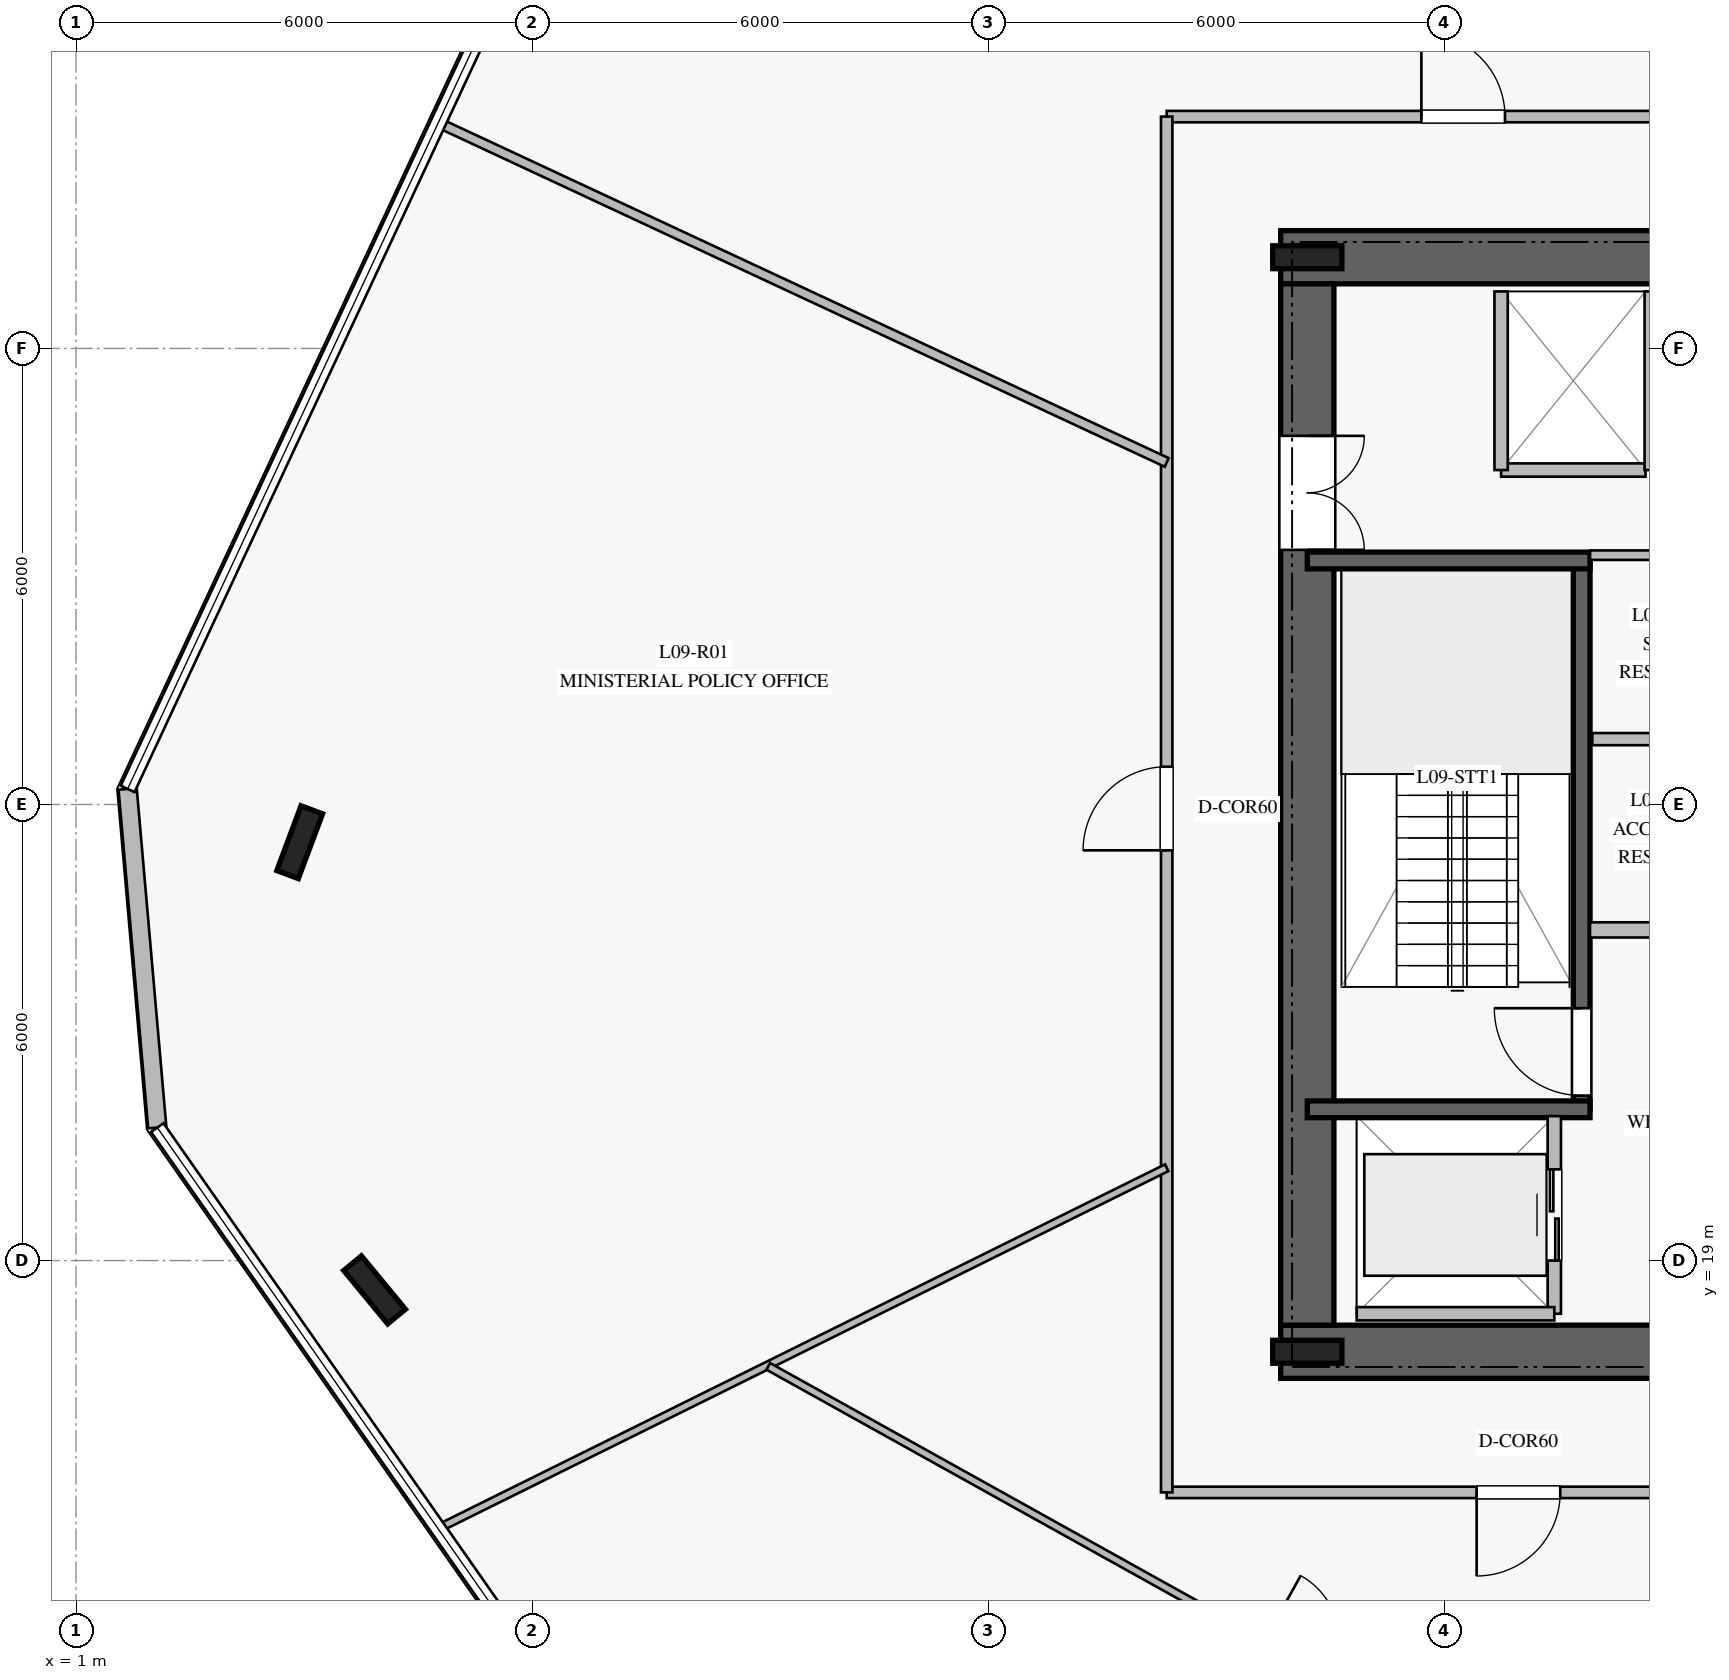
"""IFC4 building model, lengths in metres.
Left out: names, types, materials, properties, quantities, classifications, styles, units other than length and angle.
Written with IfcOpenShell. Run it as: python <this file> out.ifc"""

import sys

from ifc_helpers import new_model, si_unit, direction, frame, frame_2d, origin, origin_2d, place, context, subcontext, project, spatial, rectangle, i_section, extrude, element, fill, save


model = new_model("IFC4")
c1 = context("Model", 3, precision=1e-05, world=origin(), true_north=direction((0.0, 1.0)))
c2 = subcontext(c1, "Body", "Model", "MODEL_VIEW")
j1 = project(units=[si_unit("LENGTHUNIT", "METRE"), si_unit("PLANEANGLEUNIT", "RADIAN")], contexts=[c1])
p1 = place(None, origin())
s1 = spatial("IfcSite", under=j1, at=p1, CompositionType="ELEMENT")
p2 = place(p1, origin())
s2 = spatial("IfcBuilding", under=s1, at=p2, CompositionType="ELEMENT")
p3 = place(p2, frame((0.0, 0.0, 40.0)))
s3 = spatial("IfcBuildingStorey", under=s2, at=p3, CompositionType="ELEMENT", Elevation=40.0)
p4 = place(p3, frame((16.85, 17.8, 0.0), z_axis=(0.0, 0.0, 1.0), x_axis=(1.0, 0.0, 0.0)))
e1 = element("IfcWall", 1, at=p4, inside=s3, PredefinedType="SHEAR", context=c2, shape_type="SweptSolid", body=[
    extrude(rectangle(XDim=16.3, YDim=0.7, at=frame_2d((8.15, 0.0))), origin(), (0.0, 0.0, 1.0), 3.76),
])
p5 = place(p4, frame((5.1, 0.0, 0.0)))
e2 = element("IfcOpeningElement", 2, at=p5, cuts=e1, PredefinedType="OPENING", context=c2, shape_type="SweptSolid", body=[
    extrude(rectangle(XDim=1.2, YDim=2.25, at=frame_2d((0.6, 1.125))), frame((0.0, 0.36, 0.0), z_axis=(0.0, -1.0, 0.0), x_axis=(1.0, 0.0, 0.0)), (0.0, 0.0, 1.0), 0.72),
])
p6 = place(p4, frame((14.05, 0.0, 0.0)))
e3 = element("IfcOpeningElement", 3, at=p6, cuts=e1, PredefinedType="OPENING", context=c2, shape_type="SweptSolid", body=[
    extrude(rectangle(XDim=0.9, YDim=2.1, at=frame_2d((0.45, 1.05))), frame((0.0, 0.36, 0.0), z_axis=(0.0, -1.0, 0.0), x_axis=(1.0, 0.0, 0.0)), (0.0, 0.0, 1.0), 0.72),
])
p7 = place(p4, frame((7.95, 0.0, 0.0)))
e4 = element("IfcOpeningElement", 4, at=p7, cuts=e1, PredefinedType="OPENING", context=c2, shape_type="SweptSolid", body=[
    extrude(rectangle(XDim=1.1, YDim=2.2, at=frame_2d((0.55, 1.1))), frame((0.0, 0.36, 0.0), z_axis=(0.0, -1.0, 0.0), x_axis=(1.0, 0.0, 0.0)), (0.0, 0.0, 1.0), 0.72),
])
p8 = place(p4, frame((9.925, 0.0, 0.0)))
e5 = element("IfcOpeningElement", 5, at=p8, cuts=e1, PredefinedType="OPENING", context=c2, shape_type="SweptSolid", body=[
    extrude(rectangle(XDim=1.1, YDim=2.2, at=frame_2d((0.55, 1.1))), frame((0.0, 0.36, 0.0), z_axis=(0.0, -1.0, 0.0), x_axis=(1.0, 0.0, 0.0)), (0.0, 0.0, 1.0), 0.72),
])
p9 = place(p4, frame((11.9, 0.0, 0.0)))
e6 = element("IfcOpeningElement", 6, at=p9, cuts=e1, PredefinedType="OPENING", context=c2, shape_type="SweptSolid", body=[
    extrude(rectangle(XDim=1.1, YDim=2.2, at=frame_2d((0.55, 1.1))), frame((0.0, 0.36, 0.0), z_axis=(0.0, -1.0, 0.0), x_axis=(1.0, 0.0, 0.0)), (0.0, 0.0, 1.0), 0.72),
])
p10 = place(p3, frame((33.15, 32.2, 0.0), z_axis=(0.0, 0.0, 1.0), x_axis=(-1.0, 0.0, 0.0)))
e7 = element("IfcWall", 7, at=p10, inside=s3, PredefinedType="SHEAR", context=c2, shape_type="SweptSolid", body=[
    extrude(rectangle(XDim=16.3, YDim=0.7, at=frame_2d((8.15, 0.0))), origin(), (0.0, 0.0, 1.0), 3.76),
])
p11 = place(p10, frame((5.1, 0.0, 0.0)))
e8 = element("IfcOpeningElement", 8, at=p11, cuts=e7, PredefinedType="OPENING", context=c2, shape_type="SweptSolid", body=[
    extrude(rectangle(XDim=1.2, YDim=2.25, at=frame_2d((0.6, 1.125))), frame((0.0, 0.36, 0.0), z_axis=(0.0, -1.0, 0.0), x_axis=(1.0, 0.0, 0.0)), (0.0, 0.0, 1.0), 0.72),
])
p12 = place(p3, frame((17.2, 31.85, 0.0), z_axis=(0.0, 0.0, 1.0), x_axis=(0.0, -1.0, 0.0)))
e9 = element("IfcWall", 9, at=p12, inside=s3, PredefinedType="SHEAR", context=c2, shape_type="SweptSolid", body=[
    extrude(rectangle(XDim=13.7, YDim=0.7, at=frame_2d((6.85, 0.0))), origin(), (0.0, 0.0, 1.0), 3.76),
])
p13 = place(p12, frame((2.0, 0.0, 0.0)))
e10 = element("IfcOpeningElement", 10, at=p13, cuts=e9, PredefinedType="OPENING", context=c2, shape_type="SweptSolid", body=[
    extrude(rectangle(XDim=1.5, YDim=2.2, at=frame_2d((0.75, 1.1))), frame((0.0, 0.36, 0.0), z_axis=(0.0, -1.0, 0.0), x_axis=(1.0, 0.0, 0.0)), (0.0, 0.0, 1.0), 0.72),
])
for number, where, z_axis, x_axis in (
    (11, (17.2, 17.8, 0.0), (0.0, 0.0, 1.0), (1.0, 0.0, 0.0)),
    (12, (17.2, 32.2, 0.0), (0.0, 0.0, 1.0), (1.0, 0.0, 0.0)),
):
    element("IfcColumn", number, at=place(p3, frame(where, z_axis=z_axis, x_axis=x_axis)), inside=s3, PredefinedType="COLUMN", context=c2, shape_type="SweptSolid", body=[
        extrude(i_section(OverallWidth=0.302, OverallDepth=0.91, WebThickness=0.021, FlangeThickness=0.04, at=origin_2d()), origin(), (0.0, 0.0, 1.0), 4.0),
    ])
p14 = place(p3, frame((20.81, 20.99, 0.0), z_axis=(0.0, 0.0, 1.0), x_axis=(0.0, 1.0, 0.0)))
e13 = element("IfcWall", 13, at=p14, inside=s3, PredefinedType="SOLIDWALL", context=c2, shape_type="SweptSolid", body=[
    extrude(rectangle(XDim=7.22, YDim=0.22, at=frame_2d((3.61, 0.0))), origin(), (0.0, 0.0, 1.0), 3.76),
])
p15 = place(p14, frame((0.18, 0.0, 0.0)))
e14 = element("IfcOpeningElement", 14, at=p15, cuts=e13, PredefinedType="OPENING", context=c2, shape_type="SweptSolid", body=[
    extrude(rectangle(XDim=1.15, YDim=2.2, at=frame_2d((0.575, 1.1))), frame((0.0, 0.12, 0.0), z_axis=(0.0, -1.0, 0.0), x_axis=(1.0, 0.0, 0.0)), (0.0, 0.0, 1.0), 0.24),
])
for number, where, z_axis, x_axis in (
    (15, (17.2, 20.99, 0.0), (0.0, 0.0, 1.0), (1.0, 0.0, 0.0)),
    (16, (17.2, 28.21, 0.0), (0.0, 0.0, 1.0), (1.0, 0.0, 0.0)),
):
    element("IfcWall", number, at=place(p3, frame(where, z_axis=z_axis, x_axis=x_axis)), inside=s3, PredefinedType="SOLIDWALL", context=c2, shape_type="SweptSolid", body=[
        extrude(rectangle(XDim=3.72, YDim=0.22, at=frame_2d((1.86, 0.0))), origin(), (0.0, 0.0, 1.0), 3.76),
    ])
for number, where, z_axis, x_axis in (
    (17, (3.943, 24.504, 0.0), (0.0, 0.0, 1.0), (0.35, 0.937, 0.0)),
    (18, (4.928, 18.614, 0.0), (0.0, 0.0, 1.0), (-0.636, 0.772, 0.0)),
):
    element("IfcColumn", number, at=place(p3, frame(where, z_axis=z_axis, x_axis=x_axis)), inside=s3, PredefinedType="COLUMN", context=c2, shape_type="SweptSolid", body=[
        extrude(i_section(OverallWidth=0.302, OverallDepth=0.91, WebThickness=0.021, FlangeThickness=0.04, at=origin_2d()), origin(), (0.0, 0.0, 1.0), 4.0),
    ])
p16 = place(p3, frame((1.679, 25.205, 0.0), z_axis=(0.0, 0.0, 1.0), x_axis=(0.087218406941, -0.996189213699, 0.0)))
e19 = element("IfcWall", 19, at=p16, inside=s3, PredefinedType="STANDARD", context=c2, shape_type="SweptSolid", body=[
    extrude(rectangle(XDim=4.473, YDim=0.24, at=frame_2d((2.237, 0.0))), origin(), (0.0, 0.0, 1.0), 3.76),
])
p17 = place(p3, frame((20.92, 23.35, 0.0), z_axis=(0.0, 0.0, 1.0), x_axis=(1.0, 0.0, 0.0)))
e20 = element("IfcWall", 20, at=p17, inside=s3, PredefinedType="PARTITIONING", context=c2, shape_type="SweptSolid", body=[
    extrude(rectangle(XDim=3.38, YDim=0.2, at=frame_2d((1.69, 0.0))), origin(), (0.0, 0.0, 1.0), 3.76),
])
p18 = place(p3, frame((20.92, 28.28, 0.0), z_axis=(0.0, 0.0, 1.0), x_axis=(1.0, 0.0, 0.0)))
e21 = element("IfcWall", 21, at=p18, inside=s3, PredefinedType="PARTITIONING", context=c2, shape_type="SweptSolid", body=[
    extrude(rectangle(XDim=3.405, YDim=0.125, at=frame_2d((1.703, 0.0))), origin(), (0.0, 0.0, 1.0), 3.76),
])
p19 = place(p3, frame((20.95, 25.86, 0.0), z_axis=(0.0, 0.0, 1.0), x_axis=(1.0, 0.0, 0.0)))
e22 = element("IfcWall", 22, at=p19, inside=s3, PredefinedType="PLUMBINGWALL", context=c2, shape_type="SweptSolid", body=[
    extrude(rectangle(XDim=3.3, YDim=0.16, at=frame_2d((1.65, 0.0))), origin(), (0.0, 0.0, 1.0), 3.76),
])
p20 = place(p3, frame((19.75, 29.4, 0.0), z_axis=(0.0, 0.0, 1.0), x_axis=(1.0, 0.0, 0.0)))
e23 = element("IfcWall", 23, at=p20, inside=s3, PredefinedType="PARTITIONING", context=c2, shape_type="SweptSolid", body=[
    extrude(rectangle(XDim=1.9, YDim=0.175, at=frame_2d((0.95, 0.0))), origin(), (0.0, 0.0, 1.0), 3.76),
])
for number, where, z_axis, x_axis in (
    (24, (19.75, 29.4, 0.0), (0.0, 0.0, 1.0), (0.0, 1.0, 0.0)),
    (25, (21.725, 29.4, 0.0), (0.0, 0.0, 1.0), (0.0, 1.0, 0.0)),
):
    element("IfcWall", number, at=place(p3, frame(where, z_axis=z_axis, x_axis=x_axis)), inside=s3, PredefinedType="PARTITIONING", context=c2, shape_type="SweptSolid", body=[
        extrude(rectangle(XDim=2.35, YDim=0.175, at=frame_2d((1.175, 0.0))), origin(), (0.0, 0.0, 1.0), 3.76),
    ])
p21 = place(p3, frame((20.45, 18.3, 0.0), z_axis=(0.0, 0.0, 1.0), x_axis=(0.0, 1.0, 0.0)))
e26 = element("IfcWall", 26, at=p21, inside=s3, PredefinedType="PARTITIONING", context=c2, shape_type="SweptSolid", body=[
    extrude(rectangle(XDim=2.6, YDim=0.175, at=frame_2d((1.3, 0.0))), origin(), (0.0, 0.0, 1.0), 3.76),
])
p22 = place(p21, frame((0.7, 0.0, 0.0)))
e27 = element("IfcOpeningElement", 27, at=p22, cuts=e26, PredefinedType="OPENING", context=c2, shape_type="SweptSolid", body=[
    extrude(rectangle(XDim=1.2, YDim=2.2, at=frame_2d((0.6, 1.1))), frame((0.0, 0.098, 0.0), z_axis=(0.0, -1.0, 0.0), x_axis=(1.0, 0.0, 0.0)), (0.0, 0.0, 1.0), 0.195),
])
p23 = place(p3, frame((17.85, 18.3, 0.0), z_axis=(0.0, 0.0, 1.0), x_axis=(1.0, 0.0, 0.0)))
e28 = element("IfcWall", 28, at=p23, inside=s3, PredefinedType="PARTITIONING", context=c2, shape_type="SweptSolid", body=[
    extrude(rectangle(XDim=2.6, YDim=0.175, at=frame_2d((1.3, 0.0))), origin(), (0.0, 0.0, 1.0), 3.76),
])
p24 = place(p3, frame((15.35, 34.05, 0.0), z_axis=(0.0, 0.0, 1.0), x_axis=(1.0, 0.0, 0.0)))
e29 = element("IfcWall", 29, at=p24, inside=s3, PredefinedType="PARTITIONING", context=c2, shape_type="SweptSolid", body=[
    extrude(rectangle(XDim=19.3, YDim=0.15, at=frame_2d((9.65, 0.0))), origin(), (0.0, 0.0, 1.0), 3.21),
])
p25 = place(p24, frame((12.044, 0.0, 0.0)))
e30 = element("IfcOpeningElement", 30, at=p25, cuts=e29, PredefinedType="OPENING", context=c2, shape_type="SweptSolid", body=[
    extrude(rectangle(XDim=1.1, YDim=2.2, at=frame_2d((0.55, 1.1))), frame((0.0, 0.085, 0.0), z_axis=(0.0, -1.0, 0.0), x_axis=(1.0, 0.0, 0.0)), (0.0, 0.0, 1.0), 0.17),
])
p26 = place(p24, frame((3.351, 0.0, 0.0)))
e31 = element("IfcOpeningElement", 31, at=p26, cuts=e29, PredefinedType="OPENING", context=c2, shape_type="SweptSolid", body=[
    extrude(rectangle(XDim=1.1, YDim=2.2, at=frame_2d((0.55, 1.1))), frame((0.0, 0.085, 0.0), z_axis=(0.0, -1.0, 0.0), x_axis=(1.0, 0.0, 0.0)), (0.0, 0.0, 1.0), 0.17),
])
p27 = place(p3, frame((34.65, 15.95, 0.0), z_axis=(0.0, 0.0, 1.0), x_axis=(-1.0, 0.0, 0.0)))
e32 = element("IfcWall", 32, at=p27, inside=s3, PredefinedType="PARTITIONING", context=c2, shape_type="SweptSolid", body=[
    extrude(rectangle(XDim=19.3, YDim=0.15, at=frame_2d((9.65, 0.0))), origin(), (0.0, 0.0, 1.0), 3.21),
])
p28 = place(p27, frame((14.122, 0.0, 0.0)))
e33 = element("IfcOpeningElement", 33, at=p28, cuts=e32, PredefinedType="OPENING", context=c2, shape_type="SweptSolid", body=[
    extrude(rectangle(XDim=1.1, YDim=2.2, at=frame_2d((0.55, 1.1))), frame((0.0, 0.085, 0.0), z_axis=(0.0, -1.0, 0.0), x_axis=(1.0, 0.0, 0.0)), (0.0, 0.0, 1.0), 0.17),
])
p29 = place(p27, frame((4.66, 0.0, 0.0)))
e34 = element("IfcOpeningElement", 34, at=p29, cuts=e32, PredefinedType="OPENING", context=c2, shape_type="SweptSolid", body=[
    extrude(rectangle(XDim=1.1, YDim=2.2, at=frame_2d((0.55, 1.1))), frame((0.0, 0.085, 0.0), z_axis=(0.0, -1.0, 0.0), x_axis=(1.0, 0.0, 0.0)), (0.0, 0.0, 1.0), 0.17),
])
p30 = place(p3, frame((15.35, 15.95, 0.0), z_axis=(0.0, 0.0, 1.0), x_axis=(0.0, 1.0, 0.0)))
e35 = element("IfcWall", 35, at=p30, inside=s3, PredefinedType="PARTITIONING", context=c2, shape_type="SweptSolid", body=[
    extrude(rectangle(XDim=18.1, YDim=0.15, at=frame_2d((9.05, 0.0))), origin(), (0.0, 0.0, 1.0), 3.21),
])
p31 = place(p30, frame((8.447, 0.0, 0.0)))
e36 = element("IfcOpeningElement", 36, at=p31, cuts=e35, PredefinedType="OPENING", context=c2, shape_type="SweptSolid", body=[
    extrude(rectangle(XDim=1.1, YDim=2.2, at=frame_2d((0.55, 1.1))), frame((0.0, 0.085, 0.0), z_axis=(0.0, -1.0, 0.0), x_axis=(1.0, 0.0, 0.0)), (0.0, 0.0, 1.0), 0.17),
])
p32 = place(p3, frame((22.802, 34.05, 0.0), z_axis=(0.0, 0.0, 1.0), x_axis=(-0.236073856764, 0.971735115221, 0.0)))
e37 = element("IfcWall", 37, at=p32, inside=s3, PredefinedType="MOVABLE", context=c2, shape_type="SweptSolid", body=[
    extrude(rectangle(XDim=12.136, YDim=0.1, at=frame_2d((6.068, 0.0))), origin(), (0.0, 0.0, 1.0), 3.06),
])
p33 = place(p3, frame((15.35, 29.5, 0.0), z_axis=(0.0, 0.0, 1.0), x_axis=(-0.906299491234, 0.42263605169, 0.0)))
e38 = element("IfcWall", 38, at=p33, inside=s3, PredefinedType="PARTITIONING", context=c2, shape_type="SweptSolid", body=[
    extrude(rectangle(XDim=10.557, YDim=0.125, at=frame_2d((5.279, 0.0))), origin(), (0.0, 0.0, 1.0), 3.06),
])
p34 = place(p3, frame((15.35, 20.221, 0.0), z_axis=(0.0, 0.0, 1.0), x_axis=(-0.896125940775, -0.443799840322, 0.0)))
e39 = element("IfcWall", 39, at=p34, inside=s3, PredefinedType="MOVABLE", context=c2, shape_type="SweptSolid", body=[
    extrude(rectangle(XDim=10.68, YDim=0.1, at=frame_2d((5.34, 0.0))), origin(), (0.0, 0.0, 1.0), 3.05),
])
p35 = place(p3, frame((10.108, 17.608, 0.0), z_axis=(0.0, 0.0, 1.0), x_axis=(0.873848208076, -0.486198837147, 0.0)))
e40 = element("IfcWall", 40, at=p35, inside=s3, PredefinedType="MOVABLE", context=c2, shape_type="SweptSolid", body=[
    extrude(rectangle(XDim=15.919, YDim=0.1, at=frame_2d((7.96, 0.0))), origin(), (0.0, 0.0, 1.0), 3.02),
])
p36 = place(p35, frame((7.46, 0.0, 0.0)))
e41 = element("IfcOpeningElement", 41, at=p36, cuts=e40, PredefinedType="OPENING", context=c2, shape_type="SweptSolid", body=[
    extrude(rectangle(XDim=1.0, YDim=2.15, at=frame_2d((0.5, 1.075))), frame((0.0, 0.06, 0.0), z_axis=(0.0, -1.0, 0.0), x_axis=(1.0, 0.0, 0.0)), (0.0, 0.0, 1.0), 0.12),
])
p37 = place(p15, origin())
e42 = element("IfcDoor", 42, at=p37, inside=s3, OperationType="SINGLE_SWING_RIGHT", PredefinedType="DOOR", context=c2, shape_type="SweptSolid", body=[
    extrude(rectangle(XDim=1.15, YDim=2.2, at=frame_2d((0.575, 1.1))), frame((0.0, 0.025, 0.0), z_axis=(0.0, -1.0, 0.0), x_axis=(1.0, 0.0, 0.0)), (0.0, 0.0, 1.0), 0.05),
])
fill(e14, e42)
p38 = place(p13, origin())
e43 = element("IfcDoor", 43, at=p38, inside=s3, OperationType="DOUBLE_DOOR_SINGLE_SWING", PredefinedType="DOOR", context=c2, shape_type="SweptSolid", body=[
    extrude(rectangle(XDim=1.5, YDim=2.2, at=frame_2d((0.75, 1.1))), frame((0.0, 0.025, 0.0), z_axis=(0.0, -1.0, 0.0), x_axis=(1.0, 0.0, 0.0)), (0.0, 0.0, 1.0), 0.05),
])
fill(e10, e43)
p39 = place(p22, origin())
e44 = element("IfcDoor", 44, at=p39, inside=s3, OperationType="DOUBLE_DOOR_SLIDING", PredefinedType="DOOR", context=c2, shape_type="SweptSolid", body=[
    extrude(rectangle(XDim=1.2, YDim=2.2, at=frame_2d((0.6, 1.1))), frame((0.0, 0.025, 0.0), z_axis=(0.0, -1.0, 0.0), x_axis=(1.0, 0.0, 0.0)), (0.0, 0.0, 1.0), 0.05),
])
fill(e27, e44)
p40 = place(p31, origin())
e45 = element("IfcDoor", 45, at=p40, inside=s3, OperationType="SINGLE_SWING_LEFT", PredefinedType="DOOR", context=c2, shape_type="SweptSolid", body=[
    extrude(rectangle(XDim=1.1, YDim=2.2, at=frame_2d((0.55, 1.1))), frame((0.0, 0.025, 0.0), z_axis=(0.0, -1.0, 0.0), x_axis=(1.0, 0.0, 0.0)), (0.0, 0.0, 1.0), 0.05),
])
fill(e36, e45)
p41 = place(p28, origin())
e46 = element("IfcDoor", 46, at=p41, inside=s3, OperationType="SINGLE_SWING_RIGHT", PredefinedType="DOOR", context=c2, shape_type="SweptSolid", body=[
    extrude(rectangle(XDim=1.1, YDim=2.2, at=frame_2d((0.55, 1.1))), frame((0.0, 0.025, 0.0), z_axis=(0.0, -1.0, 0.0), x_axis=(1.0, 0.0, 0.0)), (0.0, 0.0, 1.0), 0.05),
])
fill(e33, e46)
p42 = place(p26, origin())
e47 = element("IfcDoor", 47, at=p42, inside=s3, OperationType="SINGLE_SWING_LEFT", PredefinedType="DOOR", context=c2, shape_type="SweptSolid", body=[
    extrude(rectangle(XDim=1.1, YDim=2.2, at=frame_2d((0.55, 1.1))), frame((0.0, 0.025, 0.0), z_axis=(0.0, -1.0, 0.0), x_axis=(1.0, 0.0, 0.0)), (0.0, 0.0, 1.0), 0.05),
])
fill(e31, e47)
save(model, sys.argv[1])
